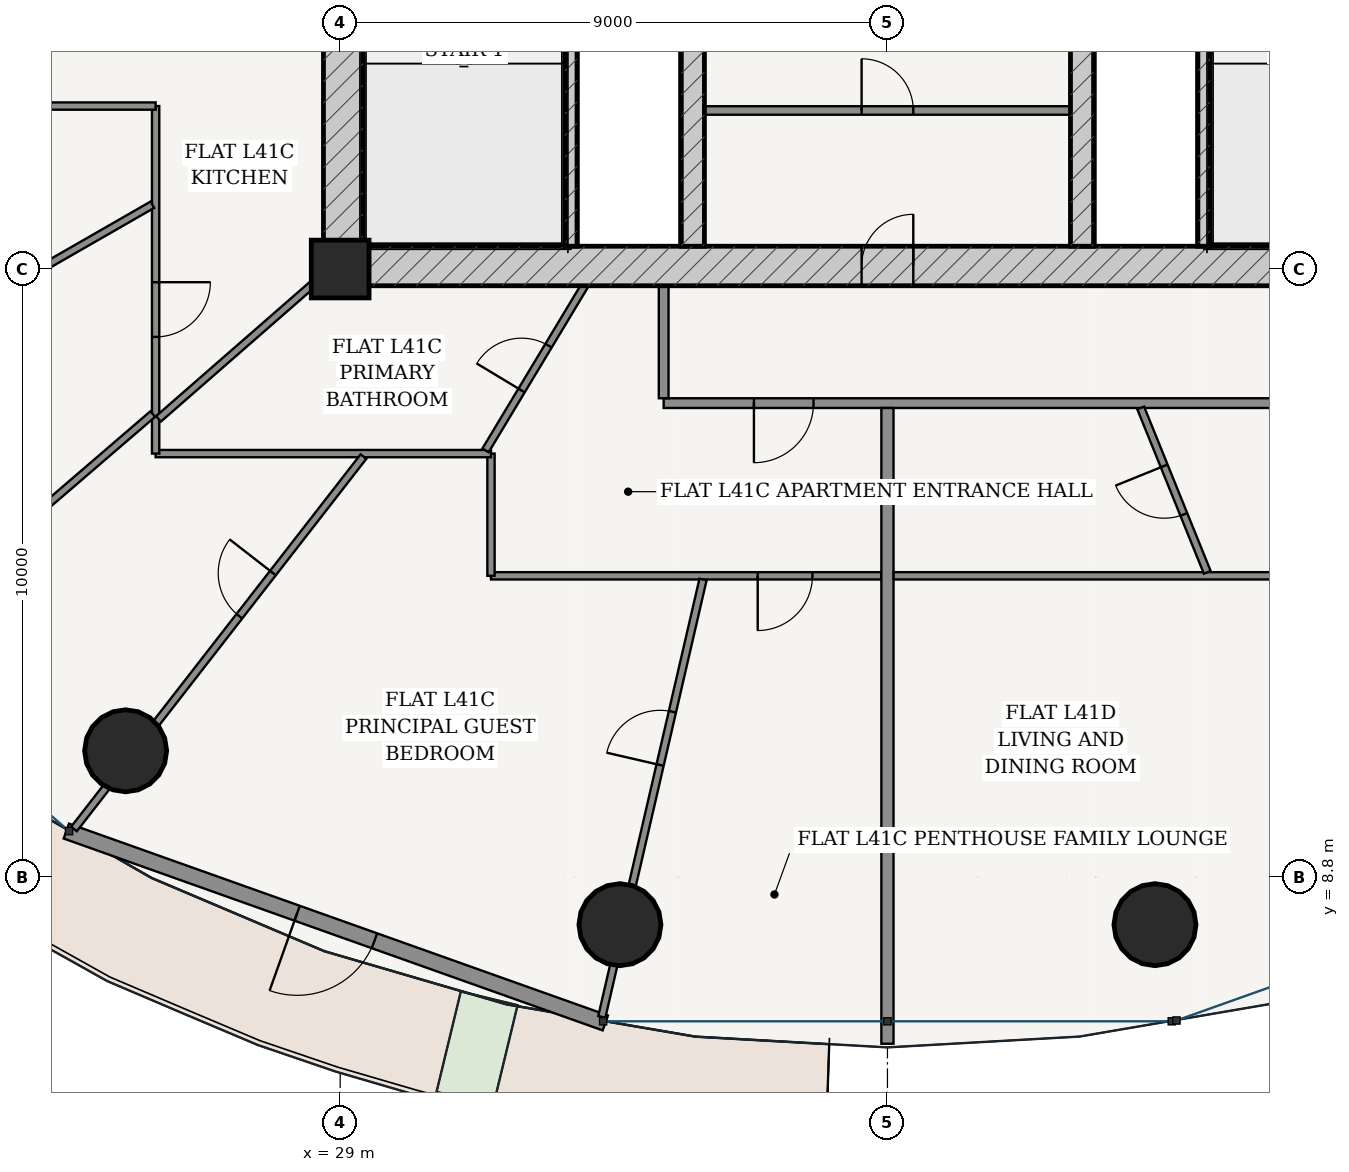
"""IFC4 building model, lengths in metres.
Left out: names, types, materials, properties, quantities, classifications, styles, units other than length and angle.
Written with IfcOpenShell. Run it as: python <this file> out.ifc"""

import sys

from ifc_helpers import new_model, si_unit, direction, frame, frame_2d, origin, origin_2d, place, context, subcontext, project, spatial, rectangle, hollow_circle, extrude, source, transform, mapped, element, fill, save


model = new_model("IFC4")
c1 = context("Model", 3, precision=1e-05, world=origin(), true_north=direction((-0.2419218956, 0.970295726276)))
c2 = subcontext(c1, "Body", "Model", "MODEL_VIEW")
j1 = project(units=[si_unit("LENGTHUNIT", "METRE"), si_unit("PLANEANGLEUNIT", "RADIAN")], contexts=[c1])
p1 = place(None, origin())
s1 = spatial("IfcSite", under=j1, at=p1, CompositionType="ELEMENT")
p2 = place(p1, origin())
s2 = spatial("IfcBuilding", under=s1, at=p2, CompositionType="ELEMENT")
p3 = place(p2, frame((0.0, 0.0, 157.0)))
s3 = spatial("IfcBuildingStorey", under=s2, at=p3, CompositionType="ELEMENT", Elevation=157.0)
p4 = place(p3, frame((29.0, 18.8, 0.0), z_axis=(0.0, 0.0, 1.0), x_axis=(1.0, 0.0, 0.0)))
e1 = element("IfcColumn", 1, at=p4, inside=s3, PredefinedType="COLUMN", context=c2, shape_type="SweptSolid", body=[
    extrude(rectangle(XDim=0.95, YDim=0.95, at=origin_2d()), origin(), (0.0, 0.0, 1.0), 3.6),
])
p5 = place(p3, frame((28.725, 18.85, 0.0), z_axis=(0.0, 0.0, 1.0), x_axis=(1.0, 0.0, 0.0)))
e2 = element("IfcWall", 2, at=p5, inside=s3, PredefinedType="SHEAR", context=c2, shape_type="SweptSolid", body=[
    extrude(rectangle(XDim=18.55, YDim=0.65, at=frame_2d((9.275, 0.0))), origin(), (0.0, 0.0, 1.0), 3.33),
])
p6 = place(p5, frame((8.85, 0.0, 0.0)))
e3 = element("IfcOpeningElement", 3, at=p6, cuts=e2, PredefinedType="OPENING", context=c2, shape_type="SweptSolid", body=[
    extrude(rectangle(XDim=0.85, YDim=2.1, at=frame_2d((0.425, 1.05))), frame((0.0, 0.335, 0.0), z_axis=(0.0, -1.0, 0.0), x_axis=(1.0, 0.0, 0.0)), (0.0, 0.0, 1.0), 0.67),
])
p7 = place(p3, frame((29.05, 19.175, 0.0), z_axis=(0.0, 0.0, 1.0), x_axis=(0.0, 1.0, 0.0)))
e4 = element("IfcWall", 4, at=p7, inside=s3, PredefinedType="SHEAR", context=c2, shape_type="SweptSolid", body=[
    extrude(rectangle(XDim=15.25, YDim=0.65, at=frame_2d((7.625, 0.0))), origin(), (0.0, 0.0, 1.0), 3.33),
])
p8 = place(p7, frame((9.875, 0.0, 0.0)))
e5 = element("IfcOpeningElement", 5, at=p8, cuts=e4, PredefinedType="OPENING", context=c2, shape_type="SweptSolid", body=[
    extrude(rectangle(XDim=1.5, YDim=2.2, at=frame_2d((0.75, 1.1))), frame((0.0, 0.335, 0.0), z_axis=(0.0, -1.0, 0.0), x_axis=(1.0, 0.0, 0.0)), (0.0, 0.0, 1.0), 0.67),
])
for number, where, z_axis, x_axis in (
    (6, (32.795, 19.175, 0.0), (0.0, 0.0, 1.0), (0.0, 1.0, 0.0)),
    (7, (43.205, 19.175, 0.0), (0.0, 0.0, 1.0), (0.0, 1.0, 0.0)),
):
    element("IfcWall", number, at=place(p3, frame(where, z_axis=z_axis, x_axis=x_axis)), inside=s3, PredefinedType="SOLIDWALL", context=c2, shape_type="SweptSolid", body=[
        extrude(rectangle(XDim=7.375, YDim=0.2, at=frame_2d((3.688, 0.0))), origin(), (0.0, 0.0, 1.0), 3.33),
    ])
p9 = place(p3, frame((34.8, 19.175, 0.0), z_axis=(0.0, 0.0, 1.0), x_axis=(0.0, 1.0, 0.0)))
e8 = element("IfcWall", 8, at=p9, inside=s3, PredefinedType="SHEAR", context=c2, shape_type="SweptSolid", body=[
    extrude(rectangle(XDim=15.25, YDim=0.38, at=frame_2d((7.625, 0.0))), origin(), (0.0, 0.0, 1.0), 3.33),
])
p10 = place(p9, frame((7.8, 0.0, 0.0)))
e9 = element("IfcOpeningElement", 9, at=p10, cuts=e8, PredefinedType="OPENING", context=c2, shape_type="SweptSolid", body=[
    extrude(rectangle(XDim=1.05, YDim=2.15, at=frame_2d((0.525, 1.075))), frame((0.0, 0.2, 0.0), z_axis=(0.0, -1.0, 0.0), x_axis=(1.0, 0.0, 0.0)), (0.0, 0.0, 1.0), 0.4),
])
p11 = place(p3, frame((41.2, 19.175, 0.0), z_axis=(0.0, 0.0, 1.0), x_axis=(0.0, 1.0, 0.0)))
e10 = element("IfcWall", 10, at=p11, inside=s3, PredefinedType="SHEAR", context=c2, shape_type="SweptSolid", body=[
    extrude(rectangle(XDim=15.25, YDim=0.38, at=frame_2d((7.625, 0.0))), origin(), (0.0, 0.0, 1.0), 3.33),
])
p12 = place(p11, frame((7.8, 0.0, 0.0)))
e11 = element("IfcOpeningElement", 11, at=p12, cuts=e10, PredefinedType="OPENING", context=c2, shape_type="SweptSolid", body=[
    extrude(rectangle(XDim=1.05, YDim=2.15, at=frame_2d((0.525, 1.075))), frame((0.0, 0.2, 0.0), z_axis=(0.0, -1.0, 0.0), x_axis=(1.0, 0.0, 0.0)), (0.0, 0.0, 1.0), 0.4),
])
for number, where, z_axis, x_axis in (
    (12, (25.472, 10.877, 0.0), (0.0, 0.0, 1.0), (1.0, 0.0, 0.0)),
    (13, (33.601, 8.018, 0.0), (0.0, 0.0, 1.0), (1.0, 0.0, 0.0)),
    (14, (42.399, 8.018, 0.0), (0.0, 0.0, 1.0), (1.0, 0.0, 0.0)),
):
    element("IfcColumn", number, at=place(p3, frame(where, z_axis=z_axis, x_axis=x_axis)), inside=s3, PredefinedType="COLUMN", context=c2, shape_type="SweptSolid", body=[
        extrude(hollow_circle(Radius=0.675, WallThickness=0.042, at=origin_2d()), origin(), (0.0, 0.0, 1.0), 3.6),
    ])
p13 = place(p3, frame((24.497, 9.557, 0.0), z_axis=(0.0, 0.0, 1.0), x_axis=(0.942103604331, -0.335321932934, 0.0)))
e15 = element("IfcWall", 15, at=p13, inside=s3, PredefinedType="SOLIDWALL", context=c2, shape_type="SweptSolid", body=[
    extrude(rectangle(XDim=9.408, YDim=0.26, at=frame_2d((4.704, 0.0))), origin(), (0.0, 0.0, 1.0), 3.33),
])
p14 = place(p13, frame((4.029, 0.0, 0.0)))
e16 = element("IfcOpeningElement", 16, at=p14, cuts=e15, PredefinedType="OPENING", context=c2, shape_type="SweptSolid", body=[
    extrude(rectangle(XDim=1.35, YDim=2.2, at=frame_2d((0.675, 1.1))), frame((0.0, 0.14, 0.0), z_axis=(0.0, -1.0, 0.0), x_axis=(1.0, 0.0, 0.0)), (0.0, 0.0, 1.0), 0.28),
])
p15 = place(p3, frame((34.99, 21.407, 0.0), z_axis=(0.0, 0.0, 1.0), x_axis=(1.0, 0.0, 0.0)))
e17 = element("IfcWall", 17, at=p15, inside=s3, PredefinedType="PARTITIONING", context=c2, shape_type="SweptSolid", body=[
    extrude(rectangle(XDim=6.02, YDim=0.14, at=frame_2d((3.01, 0.0))), origin(), (0.0, 0.0, 1.0), 3.33),
])
p16 = place(p15, frame((2.585, 0.0, 0.0)))
e18 = element("IfcOpeningElement", 18, at=p16, cuts=e17, PredefinedType="OPENING", context=c2, shape_type="SweptSolid", body=[
    extrude(rectangle(XDim=0.85, YDim=2.1, at=frame_2d((0.425, 1.05))), frame((0.0, 0.08, 0.0), z_axis=(0.0, -1.0, 0.0), x_axis=(1.0, 0.0, 0.0)), (0.0, 0.0, 1.0), 0.16),
])
p17 = place(p3, frame((34.32, 16.595, 0.0), z_axis=(0.0, 0.0, 1.0), x_axis=(1.0, 0.0, 0.0)))
e19 = element("IfcWall", 19, at=p17, inside=s3, PredefinedType="PARTITIONING", context=c2, shape_type="SweptSolid", body=[
    extrude(rectangle(XDim=14.885, YDim=0.16, at=frame_2d((7.442, 0.0))), origin(), (0.0, 0.0, 1.0), 2.776),
])
p18 = place(p17, frame((1.484, 0.0, 0.0)))
e20 = element("IfcOpeningElement", 20, at=p18, cuts=e19, PredefinedType="OPENING", context=c2, shape_type="SweptSolid", body=[
    extrude(rectangle(XDim=0.98, YDim=2.2, at=frame_2d((0.49, 1.1))), frame((0.0, 0.09, 0.0), z_axis=(0.0, -1.0, 0.0), x_axis=(1.0, 0.0, 0.0)), (0.0, 0.0, 1.0), 0.18),
])
p19 = place(p17, frame((10.741, 0.0, 0.0)))
e21 = element("IfcOpeningElement", 21, at=p19, cuts=e19, PredefinedType="OPENING", context=c2, shape_type="SweptSolid", body=[
    extrude(rectangle(XDim=0.98, YDim=2.2, at=frame_2d((0.49, 1.1))), frame((0.0, 0.09, 0.0), z_axis=(0.0, -1.0, 0.0), x_axis=(1.0, 0.0, 0.0)), (0.0, 0.0, 1.0), 0.18),
])
p20 = place(p3, frame((34.32, 16.675, 0.0), z_axis=(0.0, 0.0, 1.0), x_axis=(0.0, 1.0, 0.0)))
e22 = element("IfcWall", 22, at=p20, inside=s3, PredefinedType="PARTITIONING", context=c2, shape_type="SweptSolid", body=[
    extrude(rectangle(XDim=1.85, YDim=0.16, at=frame_2d((0.925, 0.0))), origin(), (0.0, 0.0, 1.0), 3.33),
])
p21 = place(p3, frame((37.898, 13.755, 0.0), z_axis=(0.0, 0.0, 1.0), x_axis=(-1.0, 0.0, 0.0)))
e23 = element("IfcWall", 23, at=p21, inside=s3, PredefinedType="PARTITIONING", context=c2, shape_type="SweptSolid", body=[
    extrude(rectangle(XDim=6.418, YDim=0.12, at=frame_2d((3.209, 0.0))), origin(), (0.0, 0.0, 1.0), 2.776),
])
p22 = place(p21, frame((1.132, 0.0, 0.0)))
e24 = element("IfcOpeningElement", 24, at=p22, cuts=e23, PredefinedType="OPENING", context=c2, shape_type="SweptSolid", body=[
    extrude(rectangle(XDim=0.9, YDim=2.15, at=frame_2d((0.45, 1.075))), frame((0.0, 0.07, 0.0), z_axis=(0.0, -1.0, 0.0), x_axis=(1.0, 0.0, 0.0)), (0.0, 0.0, 1.0), 0.14),
])
p23 = place(p3, frame((31.48, 13.755, 0.0), z_axis=(0.0, 0.0, 1.0), x_axis=(0.0, 1.0, 0.0)))
e25 = element("IfcWall", 25, at=p23, inside=s3, PredefinedType="PARTITIONING", context=c2, shape_type="SweptSolid", body=[
    extrude(rectangle(XDim=2.01, YDim=0.12, at=frame_2d((1.005, 0.0))), origin(), (0.0, 0.0, 1.0), 3.005),
])
p24 = place(p3, frame((31.48, 15.765, 0.0), z_axis=(0.0, 0.0, 1.0), x_axis=(-1.0, 0.0, 0.0)))
e26 = element("IfcWall", 26, at=p24, inside=s3, PredefinedType="PARTITIONING", context=c2, shape_type="SweptSolid", body=[
    extrude(rectangle(XDim=5.515, YDim=0.12, at=frame_2d((2.757, 0.0))), origin(), (0.0, 0.0, 1.0), 2.776),
])
p25 = place(p3, frame((25.965, 15.765, 0.0), z_axis=(0.0, 0.0, 1.0), x_axis=(0.0, 1.0, 0.0)))
e27 = element("IfcWall", 27, at=p25, inside=s3, PredefinedType="PARTITIONING", context=c2, shape_type="SweptSolid", body=[
    extrude(rectangle(XDim=5.715, YDim=0.12, at=frame_2d((2.857, 0.0))), origin(), (0.0, 0.0, 1.0), 2.776),
])
p26 = place(p25, frame((1.919, 0.0, 0.0)))
e28 = element("IfcOpeningElement", 28, at=p26, cuts=e27, PredefinedType="OPENING", context=c2, shape_type="SweptSolid", body=[
    extrude(rectangle(XDim=0.9, YDim=2.15, at=frame_2d((0.45, 1.075))), frame((0.0, 0.07, 0.0), z_axis=(0.0, -1.0, 0.0), x_axis=(1.0, 0.0, 0.0)), (0.0, 0.0, 1.0), 0.14),
])
p27 = place(p3, frame((25.965, 21.48, 0.0), z_axis=(0.0, 0.0, 1.0), x_axis=(-1.0, 0.0, 0.0)))
e29 = element("IfcWall", 29, at=p27, inside=s3, PredefinedType="PARTITIONING", context=c2, shape_type="SweptSolid", body=[
    extrude(rectangle(XDim=2.01, YDim=0.12, at=frame_2d((1.005, 0.0))), origin(), (0.0, 0.0, 1.0), 3.33),
])
p28 = place(p3, frame((25.911, 19.857, 0.0), z_axis=(0.0, 0.0, 1.0), x_axis=(-0.867160939672, -0.498028015986, 0.0)))
e30 = element("IfcWall", 30, at=p28, inside=s3, PredefinedType="PARTITIONING", context=c2, shape_type="SweptSolid", body=[
    extrude(rectangle(XDim=9.152, YDim=0.12, at=frame_2d((4.576, 0.0))), origin(), (0.0, 0.0, 1.0), 2.776),
])
p29 = place(p28, frame((3.124, 0.0, 0.0)))
e31 = element("IfcOpeningElement", 31, at=p29, cuts=e30, PredefinedType="OPENING", context=c2, shape_type="SweptSolid", body=[
    extrude(rectangle(XDim=0.9, YDim=2.15, at=frame_2d((0.45, 1.075))), frame((0.0, 0.07, 0.0), z_axis=(0.0, -1.0, 0.0), x_axis=(1.0, 0.0, 0.0)), (0.0, 0.0, 1.0), 0.14),
])
p30 = place(p3, frame((25.918, 16.416, 0.0), z_axis=(0.0, 0.0, 1.0), x_axis=(-0.758356041353, -0.651840559142, 0.0)))
e32 = element("IfcWall", 32, at=p30, inside=s3, PredefinedType="PARTITIONING", context=c2, shape_type="SweptSolid", body=[
    extrude(rectangle(XDim=6.569, YDim=0.12, at=frame_2d((3.285, 0.0))), origin(), (0.0, 0.0, 1.0), 2.846),
])
p31 = place(p30, frame((2.834, 0.0, 0.0)))
e33 = element("IfcOpeningElement", 33, at=p31, cuts=e32, PredefinedType="OPENING", context=c2, shape_type="SweptSolid", body=[
    extrude(rectangle(XDim=0.9, YDim=2.15, at=frame_2d((0.45, 1.075))), frame((0.0, 0.07, 0.0), z_axis=(0.0, -1.0, 0.0), x_axis=(1.0, 0.0, 0.0)), (0.0, 0.0, 1.0), 0.14),
])
p32 = place(p3, frame((29.383, 15.716, 0.0), z_axis=(0.0, 0.0, 1.0), x_axis=(-0.613751061882, -0.789499609904, 0.0)))
e34 = element("IfcWall", 34, at=p32, inside=s3, PredefinedType="PARTITIONING", context=c2, shape_type="SweptSolid", body=[
    extrude(rectangle(XDim=7.758, YDim=0.12, at=frame_2d((3.879, 0.0))), origin(), (0.0, 0.0, 1.0), 2.776),
])
p33 = place(p32, frame((2.426, 0.0, 0.0)))
e35 = element("IfcOpeningElement", 35, at=p33, cuts=e34, PredefinedType="OPENING", context=c2, shape_type="SweptSolid", body=[
    extrude(rectangle(XDim=0.9, YDim=2.15, at=frame_2d((0.45, 1.075))), frame((0.0, 0.07, 0.0), z_axis=(0.0, -1.0, 0.0), x_axis=(1.0, 0.0, 0.0)), (0.0, 0.0, 1.0), 0.14),
])
p34 = place(p3, frame((34.967, 13.695, 0.0), z_axis=(0.0, 0.0, 1.0), x_axis=(-0.225458405801, -0.974252794327, 0.0)))
e36 = element("IfcWall", 36, at=p34, inside=s3, PredefinedType="PARTITIONING", context=c2, shape_type="SweptSolid", body=[
    extrude(rectangle(XDim=7.383, YDim=0.12, at=frame_2d((3.691, 0.0))), origin(), (0.0, 0.0, 1.0), 2.776),
])
p35 = place(p34, frame((2.232, 0.0, 0.0)))
e37 = element("IfcOpeningElement", 37, at=p35, cuts=e36, PredefinedType="OPENING", context=c2, shape_type="SweptSolid", body=[
    extrude(rectangle(XDim=0.9, YDim=2.15, at=frame_2d((0.45, 1.075))), frame((0.0, 0.07, 0.0), z_axis=(0.0, -1.0, 0.0), x_axis=(1.0, 0.0, 0.0)), (0.0, 0.0, 1.0), 0.14),
])
p36 = place(p3, frame((28.588, 18.585, 0.0), z_axis=(0.0, 0.0, 1.0), x_axis=(-0.753380933673, -0.657584343471, 0.0)))
e38 = element("IfcWall", 38, at=p36, inside=s3, PredefinedType="PARTITIONING", context=c2, shape_type="SweptSolid", body=[
    extrude(rectangle(XDim=3.42, YDim=0.12, at=frame_2d((1.71, 0.0))), origin(), (0.0, 0.0, 1.0), 3.005),
])
p37 = place(p3, frame((33.02, 18.525, 0.0), z_axis=(0.0, 0.0, 1.0), x_axis=(-0.515677168, -0.856782970421, 0.0)))
e39 = element("IfcWall", 39, at=p37, inside=s3, PredefinedType="PARTITIONING", context=c2, shape_type="SweptSolid", body=[
    extrude(rectangle(XDim=3.159, YDim=0.12, at=frame_2d((1.58, 0.0))), origin(), (0.0, 0.0, 1.0), 3.33),
])
p38 = place(p37, frame((1.15, 0.0, 0.0)))
e40 = element("IfcOpeningElement", 40, at=p38, cuts=e39, PredefinedType="OPENING", context=c2, shape_type="SweptSolid", body=[
    extrude(rectangle(XDim=0.86, YDim=2.15, at=frame_2d((0.43, 1.075))), frame((0.0, 0.07, 0.0), z_axis=(0.0, -1.0, 0.0), x_axis=(1.0, 0.0, 0.0)), (0.0, 0.0, 1.0), 0.14),
])
p39 = place(p3, frame((38.0, 16.515, 0.0), z_axis=(0.0, 0.0, 1.0), x_axis=(0.0, -1.0, 0.0)))
e41 = element("IfcWall", 41, at=p39, inside=s3, PredefinedType="PARTITIONING", context=c2, shape_type="SweptSolid", body=[
    extrude(rectangle(XDim=10.455, YDim=0.2, at=frame_2d((5.228, 0.0))), origin(), (0.0, 0.0, 1.0), 2.846),
])
p40 = place(p3, frame((52.045, 13.755, 0.0), z_axis=(0.0, 0.0, 1.0), x_axis=(-1.0, 0.0, 0.0)))
e42 = element("IfcWall", 42, at=p40, inside=s3, PredefinedType="PARTITIONING", context=c2, shape_type="SweptSolid", body=[
    extrude(rectangle(XDim=13.943, YDim=0.12, at=frame_2d((6.971, 0.0))), origin(), (0.0, 0.0, 1.0), 2.776),
])
p41 = place(p40, frame((5.9, 0.0, 0.0)))
e43 = element("IfcOpeningElement", 43, at=p41, cuts=e42, PredefinedType="OPENING", context=c2, shape_type="SweptSolid", body=[
    extrude(rectangle(XDim=0.9, YDim=2.15, at=frame_2d((0.45, 1.075))), frame((0.0, 0.07, 0.0), z_axis=(0.0, -1.0, 0.0), x_axis=(1.0, 0.0, 0.0)), (0.0, 0.0, 1.0), 0.14),
])
p42 = place(p40, frame((1.622, 0.0, 0.0)))
e44 = element("IfcOpeningElement", 44, at=p42, cuts=e42, PredefinedType="OPENING", context=c2, shape_type="SweptSolid", body=[
    extrude(rectangle(XDim=0.9, YDim=2.15, at=frame_2d((0.45, 1.075))), frame((0.0, 0.07, 0.0), z_axis=(0.0, -1.0, 0.0), x_axis=(1.0, 0.0, 0.0)), (0.0, 0.0, 1.0), 0.14),
])
p43 = place(p3, frame((42.165, 16.515, 0.0), z_axis=(0.0, 0.0, 1.0), x_axis=(0.375386324206, -0.926868441365, 0.0)))
e45 = element("IfcWall", 45, at=p43, inside=s3, PredefinedType="PARTITIONING", context=c2, shape_type="SweptSolid", body=[
    extrude(rectangle(XDim=2.916, YDim=0.12, at=frame_2d((1.458, 0.0))), origin(), (0.0, 0.0, 1.0), 3.005),
])
p44 = place(p43, frame((1.028, 0.0, 0.0)))
e46 = element("IfcOpeningElement", 46, at=p44, cuts=e45, PredefinedType="OPENING", context=c2, shape_type="SweptSolid", body=[
    extrude(rectangle(XDim=0.86, YDim=2.15, at=frame_2d((0.43, 1.075))), frame((0.0, 0.07, 0.0), z_axis=(0.0, -1.0, 0.0), x_axis=(1.0, 0.0, 0.0)), (0.0, 0.0, 1.0), 0.14),
])
m1 = source(origin(), c2, "Body", "SweptSolid", [
    extrude(rectangle(XDim=1.35, YDim=2.2, at=frame_2d((0.675, 1.1))), frame((0.0, 0.025, 0.0), z_axis=(0.0, -1.0, 0.0), x_axis=(1.0, 0.0, 0.0)), (0.0, 0.0, 1.0), 0.05),
])
p45 = place(p14, frame((1.35, 0.0, 0.0), z_axis=(0.0, 0.0, 1.0), x_axis=(-1.0, 0.0, 0.0)))
e47 = element("IfcDoor", 47, at=p45, inside=s3, OperationType="SINGLE_SWING_RIGHT", PredefinedType="DOOR", context=c2, shape_type="MappedRepresentation", body=[
    mapped(m1, transform((0.0, 0.0, 0.0), scale=1.0)),
])
fill(e16, e47)
m2 = source(origin(), c2, "Body", "SweptSolid", [
    extrude(rectangle(XDim=0.85, YDim=2.1, at=frame_2d((0.425, 1.05))), frame((0.0, 0.025, 0.0), z_axis=(0.0, -1.0, 0.0), x_axis=(1.0, 0.0, 0.0)), (0.0, 0.0, 1.0), 0.05),
])
p46 = place(p6, origin())
e48 = element("IfcDoor", 48, at=p46, inside=s3, OperationType="SINGLE_SWING_RIGHT", PredefinedType="DOOR", context=c2, shape_type="MappedRepresentation", body=[
    mapped(m2, transform((0.0, 0.0, 0.0), scale=1.0)),
])
fill(e3, e48)
p47 = place(p16, origin())
e49 = element("IfcDoor", 49, at=p47, inside=s3, OperationType="SINGLE_SWING_LEFT", PredefinedType="DOOR", context=c2, shape_type="MappedRepresentation", body=[
    mapped(m2, transform((0.0, 0.0, 0.0), scale=1.0)),
])
fill(e18, e49)
m3 = source(origin(), c2, "Body", "SweptSolid", [
    extrude(rectangle(XDim=0.98, YDim=2.2, at=frame_2d((0.49, 1.1))), frame((0.0, 0.025, 0.0), z_axis=(0.0, -1.0, 0.0), x_axis=(1.0, 0.0, 0.0)), (0.0, 0.0, 1.0), 0.05),
])
p48 = place(p18, frame((0.98, 0.0, 0.0), z_axis=(0.0, 0.0, 1.0), x_axis=(-1.0, 0.0, 0.0)))
e50 = element("IfcDoor", 50, at=p48, inside=s3, OperationType="SINGLE_SWING_RIGHT", PredefinedType="DOOR", context=c2, shape_type="MappedRepresentation", body=[
    mapped(m3, transform((0.0, 0.0, 0.0), scale=1.0)),
])
fill(e20, e50)
m4 = source(origin(), c2, "Body", "SweptSolid", [
    extrude(rectangle(XDim=0.86, YDim=2.15, at=frame_2d((0.43, 1.075))), frame((0.0, 0.025, 0.0), z_axis=(0.0, -1.0, 0.0), x_axis=(1.0, 0.0, 0.0)), (0.0, 0.0, 1.0), 0.05),
])
p49 = place(p38, frame((0.86, 0.0, 0.0), z_axis=(0.0, 0.0, 1.0), x_axis=(-1.0, 0.0, 0.0)))
e51 = element("IfcDoor", 51, at=p49, inside=s3, OperationType="SINGLE_SWING_LEFT", PredefinedType="DOOR", context=c2, shape_type="MappedRepresentation", body=[
    mapped(m4, transform((0.0, 0.0, 0.0), scale=1.0)),
])
fill(e40, e51)
m5 = source(origin(), c2, "Body", "SweptSolid", [
    extrude(rectangle(XDim=0.9, YDim=2.15, at=frame_2d((0.45, 1.075))), frame((0.0, 0.025, 0.0), z_axis=(0.0, -1.0, 0.0), x_axis=(1.0, 0.0, 0.0)), (0.0, 0.0, 1.0), 0.05),
])
p50 = place(p22, origin())
e52 = element("IfcDoor", 52, at=p50, inside=s3, OperationType="SINGLE_SWING_RIGHT", PredefinedType="DOOR", context=c2, shape_type="MappedRepresentation", body=[
    mapped(m5, transform((0.0, 0.0, 0.0), scale=1.0)),
])
fill(e24, e52)
p51 = place(p35, frame((0.9, 0.0, 0.0), z_axis=(0.0, 0.0, 1.0), x_axis=(-1.0, 0.0, 0.0)))
e53 = element("IfcDoor", 53, at=p51, inside=s3, OperationType="SINGLE_SWING_LEFT", PredefinedType="DOOR", context=c2, shape_type="MappedRepresentation", body=[
    mapped(m5, transform((0.0, 0.0, 0.0), scale=1.0)),
])
fill(e37, e53)
p52 = place(p33, frame((0.9, 0.0, 0.0), z_axis=(0.0, 0.0, 1.0), x_axis=(-1.0, 0.0, 0.0)))
e54 = element("IfcDoor", 54, at=p52, inside=s3, OperationType="SINGLE_SWING_RIGHT", PredefinedType="DOOR", context=c2, shape_type="MappedRepresentation", body=[
    mapped(m5, transform((0.0, 0.0, 0.0), scale=1.0)),
])
fill(e35, e54)
p53 = place(p26, frame((0.9, 0.0, 0.0), z_axis=(0.0, 0.0, 1.0), x_axis=(-1.0, 0.0, 0.0)))
e55 = element("IfcDoor", 55, at=p53, inside=s3, OperationType="SINGLE_SWING_LEFT", PredefinedType="DOOR", context=c2, shape_type="MappedRepresentation", body=[
    mapped(m5, transform((0.0, 0.0, 0.0), scale=1.0)),
])
fill(e28, e55)
p54 = place(p44, frame((0.86, 0.0, 0.0), z_axis=(0.0, 0.0, 1.0), x_axis=(-1.0, 0.0, 0.0)))
e56 = element("IfcDoor", 56, at=p54, inside=s3, OperationType="SINGLE_SWING_RIGHT", PredefinedType="DOOR", context=c2, shape_type="MappedRepresentation", body=[
    mapped(m4, transform((0.0, 0.0, 0.0), scale=1.0)),
])
fill(e46, e56)
save(model, sys.argv[1])
